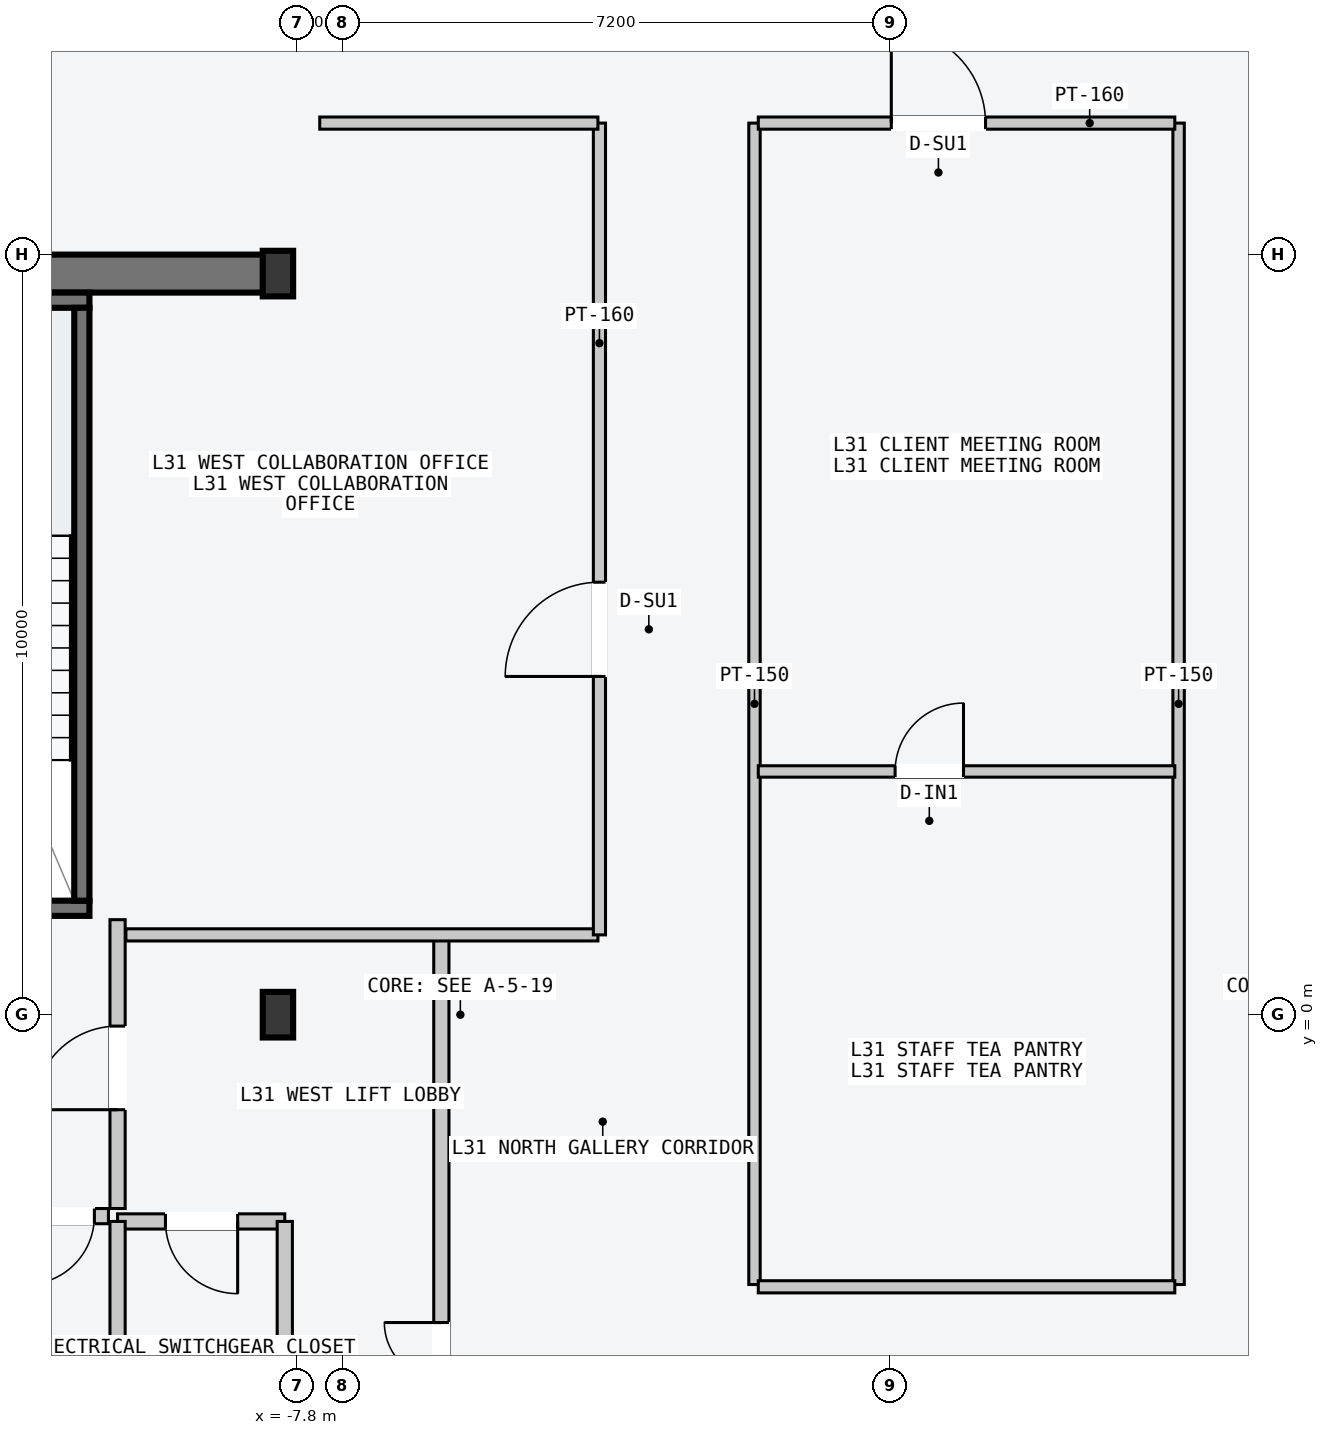
"""IFC4 building model, lengths in metres.
Left out: names, types, materials, properties, quantities, classifications, styles, units other than length and angle.
Written with IfcOpenShell. Run it as: python <this file> out.ifc"""

import sys

from ifc_helpers import new_model, si_unit, direction, frame, frame_2d, origin, origin_2d, place, context, subcontext, project, spatial, rectangle, i_section, extrude, element, fill, save


model = new_model("IFC4")
c1 = context("Model", 3, precision=1e-05, world=origin(), true_north=direction((0.0, 1.0)))
c2 = subcontext(c1, "Body", "Model", "MODEL_VIEW")
j1 = project(units=[si_unit("LENGTHUNIT", "METRE"), si_unit("PLANEANGLEUNIT", "RADIAN")], contexts=[c1])
p1 = place(None, origin())
s1 = spatial("IfcSite", under=j1, at=p1, CompositionType="ELEMENT")
p2 = place(p1, origin())
s2 = spatial("IfcBuilding", under=s1, at=p2, CompositionType="ELEMENT")
p3 = place(p2, frame((0.0, 0.0, 120.6)))
s3 = spatial("IfcBuildingStorey", under=s2, at=p3, CompositionType="ELEMENT", Elevation=120.6)
p4 = place(p3, frame((-14.53, 9.75, -0.2), z_axis=(0.0, 0.0, 1.0), x_axis=(1.0, 0.0, 0.0)))
e1 = element("IfcWall", 1, at=p4, inside=s3, PredefinedType="SHEAR", context=c2, shape_type="SweptSolid", body=[
    extrude(rectangle(XDim=6.46, YDim=0.5, at=frame_2d((3.23, 0.0))), origin(), (0.0, 0.0, 1.0), 3.6),
])
p5 = place(p3, frame((-14.25, 1.4, -0.2), z_axis=(0.0, 0.0, 1.0), x_axis=(1.0, 0.0, 0.0)))
e2 = element("IfcWall", 2, at=p5, inside=s3, PredefinedType="SOLIDWALL", context=c2, shape_type="SweptSolid", body=[
    extrude(rectangle(XDim=3.72, YDim=0.2, at=frame_2d((1.86, 0.0))), origin(), (0.0, 0.0, 1.0), 3.6),
])
p6 = place(p5, frame((1.5, 0.0, 0.2)))
e3 = element("IfcOpeningElement", 3, at=p6, cuts=e2, PredefinedType="OPENING", context=c2, shape_type="SweptSolid", body=[
    extrude(rectangle(XDim=1.12, YDim=2.18, at=frame_2d((0.56, 1.09))), frame((0.0, 0.11, 0.0), z_axis=(0.0, -1.0, 0.0), x_axis=(1.0, 0.0, 0.0)), (0.0, 0.0, 1.0), 0.22),
])
p7 = place(p3, frame((-14.25, 9.4, -0.2), z_axis=(0.0, 0.0, 1.0), x_axis=(1.0, 0.0, 0.0)))
e4 = element("IfcWall", 4, at=p7, inside=s3, PredefinedType="SOLIDWALL", context=c2, shape_type="SweptSolid", body=[
    extrude(rectangle(XDim=3.72, YDim=0.2, at=frame_2d((1.86, 0.0))), origin(), (0.0, 0.0, 1.0), 3.6),
])
p8 = place(p3, frame((-10.63, 1.5, -0.2), z_axis=(0.0, 0.0, 1.0), x_axis=(0.0, 1.0, 0.0)))
e5 = element("IfcWall", 5, at=p8, inside=s3, PredefinedType="SOLIDWALL", context=c2, shape_type="SweptSolid", body=[
    extrude(rectangle(XDim=7.8, YDim=0.2, at=frame_2d((3.9, 0.0))), origin(), (0.0, 0.0, 1.0), 3.6),
])
for number, where, z_axis, x_axis in (
    (6, (-8.05, 0.0, 0.0), (0.0, 0.0, 1.0), (1.0, 0.0, 0.0)),
    (7, (-8.05, 9.75, 0.0), (0.0, 0.0, 1.0), (1.0, 0.0, 0.0)),
):
    element("IfcColumn", number, at=place(p3, frame(where, z_axis=z_axis, x_axis=x_axis)), inside=s3, PredefinedType="COLUMN", context=c2, shape_type="SweptSolid", body=[
        extrude(i_section(OverallWidth=0.4, OverallDepth=0.6, WebThickness=0.022, FlangeThickness=0.036, at=origin_2d()), origin(), (0.0, 0.0, 1.0), 3.6),
    ])
p9 = place(p3, frame((-5.9, -9.45, 0.0), z_axis=(0.0, 0.0, 1.0), x_axis=(0.0, 1.0, 0.0)))
e8 = element("IfcWall", 8, at=p9, inside=s3, PredefinedType="PARTITIONING", context=c2, shape_type="SweptSolid", body=[
    extrude(rectangle(XDim=10.5, YDim=0.2, at=frame_2d((5.25, 0.0))), origin(), (0.0, 0.0, 1.0), 3.4),
])
p10 = place(p9, frame((3.9, 0.0, 0.0)))
e9 = element("IfcOpeningElement", 9, at=p10, cuts=e8, PredefinedType="OPENING", context=c2, shape_type="SweptSolid", body=[
    extrude(rectangle(XDim=1.5, YDim=2.2, at=frame_2d((0.75, 1.1))), frame((0.0, 0.11, 0.0), z_axis=(0.0, -1.0, 0.0), x_axis=(1.0, 0.0, 0.0)), (0.0, 0.0, 1.0), 0.22),
])
p11 = place(p3, frame((-10.16, -2.55, 0.0), z_axis=(0.0, 0.0, 1.0), x_axis=(0.0, 1.0, 0.0)))
e10 = element("IfcWall", 10, at=p11, inside=s3, PredefinedType="PARTITIONING", context=c2, shape_type="SweptSolid", body=[
    extrude(rectangle(XDim=3.8, YDim=0.2, at=frame_2d((1.9, 0.0))), origin(), (0.0, 0.0, 1.0), 3.4),
])
p12 = place(p11, frame((1.3, 0.0, 0.0)))
e11 = element("IfcOpeningElement", 11, at=p12, cuts=e10, PredefinedType="OPENING", context=c2, shape_type="SweptSolid", body=[
    extrude(rectangle(XDim=1.1, YDim=2.15, at=frame_2d((0.55, 1.075))), frame((0.0, 0.11, 0.0), z_axis=(0.0, -1.0, 0.0), x_axis=(1.0, 0.0, 0.0)), (0.0, 0.0, 1.0), 0.22),
])
p13 = place(p3, frame((-10.28, -2.65, 0.0), z_axis=(0.0, 0.0, 1.0), x_axis=(-1.0, 0.0, 0.0)))
e12 = element("IfcWall", 12, at=p13, inside=s3, PredefinedType="PARTITIONING", context=c2, shape_type="SweptSolid", body=[
    extrude(rectangle(XDim=1.27, YDim=0.2, at=frame_2d((0.635, 0.0))), origin(), (0.0, 0.0, 1.0), 3.4),
])
p14 = place(p13, frame((0.185, 0.0, 0.0)))
e13 = element("IfcOpeningElement", 13, at=p14, cuts=e12, PredefinedType="OPENING", context=c2, shape_type="SweptSolid", body=[
    extrude(rectangle(XDim=0.9, YDim=2.15, at=frame_2d((0.45, 1.075))), frame((0.0, 0.11, 0.0), z_axis=(0.0, -1.0, 0.0), x_axis=(1.0, 0.0, 0.0)), (0.0, 0.0, 1.0), 0.22),
])
p15 = place(p3, frame((-7.96, -2.72, 0.0), z_axis=(0.0, 0.0, 1.0), x_axis=(-1.0, 0.0, 0.0)))
e14 = element("IfcWall", 14, at=p15, inside=s3, PredefinedType="PARTITIONING", context=c2, shape_type="SweptSolid", body=[
    extrude(rectangle(XDim=2.2, YDim=0.2, at=frame_2d((1.1, 0.0))), origin(), (0.0, 0.0, 1.0), 3.4),
])
p16 = place(p15, frame((0.62, 0.0, 0.0)))
e15 = element("IfcOpeningElement", 15, at=p16, cuts=e14, PredefinedType="OPENING", context=c2, shape_type="SweptSolid", body=[
    extrude(rectangle(XDim=0.95, YDim=2.1, at=frame_2d((0.475, 1.05))), frame((0.0, 0.11, 0.0), z_axis=(0.0, -1.0, 0.0), x_axis=(1.0, 0.0, 0.0)), (0.0, 0.0, 1.0), 0.22),
])
for number, where, z_axis, x_axis in (
    (16, (-7.96, -5.16, 0.0), (0.0, 0.0, 1.0), (0.0, 1.0, 0.0)),
    (17, (-10.16, -5.16, 0.0), (0.0, 0.0, 1.0), (0.0, 1.0, 0.0)),
):
    element("IfcWall", number, at=place(p3, frame(where, z_axis=z_axis, x_axis=x_axis)), inside=s3, PredefinedType="PARTITIONING", context=c2, shape_type="SweptSolid", body=[
        extrude(rectangle(XDim=2.44, YDim=0.2, at=frame_2d((1.22, 0.0))), origin(), (0.0, 0.0, 1.0), 3.4),
    ])
p17 = place(p3, frame((-10.05, 1.05, 0.0), z_axis=(0.0, 0.0, 1.0), x_axis=(1.0, 0.0, 0.0)))
e18 = element("IfcWall", 18, at=p17, inside=s3, PredefinedType="PARTITIONING", context=c2, shape_type="SweptSolid", body=[
    extrude(rectangle(XDim=6.21, YDim=0.16, at=frame_2d((3.105, 0.0))), origin(), (0.0, 0.0, 1.0), 3.4),
])
p18 = place(p3, frame((-3.82, 1.05, 0.0), z_axis=(0.0, 0.0, 1.0), x_axis=(0.0, 1.0, 0.0)))
e19 = element("IfcWall", 19, at=p18, inside=s3, PredefinedType="PARTITIONING", context=c2, shape_type="SweptSolid", body=[
    extrude(rectangle(XDim=10.68, YDim=0.16, at=frame_2d((5.34, 0.0))), origin(), (0.0, 0.0, 1.0), 3.4),
])
p19 = place(p18, frame((3.4, 0.0, 0.0)))
e20 = element("IfcOpeningElement", 20, at=p19, cuts=e19, PredefinedType="OPENING", context=c2, shape_type="SweptSolid", body=[
    extrude(rectangle(XDim=1.24, YDim=2.24, at=frame_2d((0.62, 1.12))), frame((0.0, 0.09, 0.0), z_axis=(0.0, -1.0, 0.0), x_axis=(1.0, 0.0, 0.0)), (0.0, 0.0, 1.0), 0.18),
])
p20 = place(p3, frame((-7.5, 11.73, 0.0), z_axis=(0.0, 0.0, 1.0), x_axis=(1.0, 0.0, 0.0)))
e21 = element("IfcWall", 21, at=p20, inside=s3, PredefinedType="PARTITIONING", context=c2, shape_type="SweptSolid", body=[
    extrude(rectangle(XDim=3.66, YDim=0.16, at=frame_2d((1.83, 0.0))), origin(), (0.0, 0.0, 1.0), 3.4),
])
for number, where, z_axis, x_axis in (
    (22, (-1.78, -3.55, 0.0), (0.0, 0.0, 1.0), (0.0, 1.0, 0.0)),
    (23, (3.8, -3.55, 0.0), (0.0, 0.0, 1.0), (0.0, 1.0, 0.0)),
):
    element("IfcWall", number, at=place(p3, frame(where, z_axis=z_axis, x_axis=x_axis)), inside=s3, PredefinedType="PARTITIONING", context=c2, shape_type="SweptSolid", body=[
        extrude(rectangle(XDim=15.28, YDim=0.15, at=frame_2d((7.64, 0.0))), origin(), (0.0, 0.0, 1.0), 3.4),
    ])
p21 = place(p3, frame((-1.73, -3.58, 0.0), z_axis=(0.0, 0.0, 1.0), x_axis=(1.0, 0.0, 0.0)))
e24 = element("IfcWall", 24, at=p21, inside=s3, PredefinedType="PARTITIONING", context=c2, shape_type="SweptSolid", body=[
    extrude(rectangle(XDim=5.48, YDim=0.16, at=frame_2d((2.74, 0.0))), origin(), (0.0, 0.0, 1.0), 3.4),
])
p22 = place(p3, frame((-1.73, 3.2, 0.0), z_axis=(0.0, 0.0, 1.0), x_axis=(1.0, 0.0, 0.0)))
e25 = element("IfcWall", 25, at=p22, inside=s3, PredefinedType="PARTITIONING", context=c2, shape_type="SweptSolid", body=[
    extrude(rectangle(XDim=5.48, YDim=0.15, at=frame_2d((2.74, 0.0))), origin(), (0.0, 0.0, 1.0), 3.4),
])
p23 = place(p22, frame((1.8, 0.0, 0.0)))
e26 = element("IfcOpeningElement", 26, at=p23, cuts=e25, PredefinedType="OPENING", context=c2, shape_type="SweptSolid", body=[
    extrude(rectangle(XDim=0.9, YDim=2.15, at=frame_2d((0.45, 1.075))), frame((0.0, 0.085, 0.0), z_axis=(0.0, -1.0, 0.0), x_axis=(1.0, 0.0, 0.0)), (0.0, 0.0, 1.0), 0.17),
])
p24 = place(p3, frame((-1.73, 11.73, 0.0), z_axis=(0.0, 0.0, 1.0), x_axis=(1.0, 0.0, 0.0)))
e27 = element("IfcWall", 27, at=p24, inside=s3, PredefinedType="PARTITIONING", context=c2, shape_type="SweptSolid", body=[
    extrude(rectangle(XDim=5.48, YDim=0.16, at=frame_2d((2.74, 0.0))), origin(), (0.0, 0.0, 1.0), 3.4),
])
p25 = place(p24, frame((1.75, 0.0, 0.0)))
e28 = element("IfcOpeningElement", 28, at=p25, cuts=e27, PredefinedType="OPENING", context=c2, shape_type="SweptSolid", body=[
    extrude(rectangle(XDim=1.24, YDim=2.24, at=frame_2d((0.62, 1.12))), frame((0.0, 0.09, 0.0), z_axis=(0.0, -1.0, 0.0), x_axis=(1.0, 0.0, 0.0)), (0.0, 0.0, 1.0), 0.18),
])
p26 = place(p10, origin())
e29 = element("IfcDoor", 29, at=p26, inside=s3, OperationType="DOUBLE_DOOR_SINGLE_SWING", PredefinedType="DOOR", context=c2, shape_type="SweptSolid", body=[
    extrude(rectangle(XDim=1.5, YDim=2.2, at=frame_2d((0.75, 1.1))), frame((0.0, 0.025, 0.0), z_axis=(0.0, -1.0, 0.0), x_axis=(1.0, 0.0, 0.0)), (0.0, 0.0, 1.0), 0.05),
])
fill(e9, e29)
p27 = place(p12, origin())
e30 = element("IfcDoor", 30, at=p27, inside=s3, OperationType="SINGLE_SWING_LEFT", PredefinedType="DOOR", context=c2, shape_type="SweptSolid", body=[
    extrude(rectangle(XDim=1.1, YDim=2.15, at=frame_2d((0.55, 1.075))), frame((0.0, 0.025, 0.0), z_axis=(0.0, -1.0, 0.0), x_axis=(1.0, 0.0, 0.0)), (0.0, 0.0, 1.0), 0.05),
])
fill(e11, e30)
p28 = place(p14, origin())
e31 = element("IfcDoor", 31, at=p28, inside=s3, OperationType="SINGLE_SWING_RIGHT", PredefinedType="DOOR", context=c2, shape_type="SweptSolid", body=[
    extrude(rectangle(XDim=0.9, YDim=2.15, at=frame_2d((0.45, 1.075))), frame((0.0, 0.025, 0.0), z_axis=(0.0, -1.0, 0.0), x_axis=(1.0, 0.0, 0.0)), (0.0, 0.0, 1.0), 0.05),
])
fill(e13, e31)
p29 = place(p16, origin())
e32 = element("IfcDoor", 32, at=p29, inside=s3, OperationType="SINGLE_SWING_LEFT", PredefinedType="DOOR", context=c2, shape_type="SweptSolid", body=[
    extrude(rectangle(XDim=0.95, YDim=2.1, at=frame_2d((0.475, 1.05))), frame((0.0, 0.025, 0.0), z_axis=(0.0, -1.0, 0.0), x_axis=(1.0, 0.0, 0.0)), (0.0, 0.0, 1.0), 0.05),
])
fill(e15, e32)
p30 = place(p19, origin())
e33 = element("IfcDoor", 33, at=p30, inside=s3, OperationType="SINGLE_SWING_LEFT", PredefinedType="DOOR", context=c2, shape_type="SweptSolid", body=[
    extrude(rectangle(XDim=1.24, YDim=2.24, at=frame_2d((0.62, 1.12))), frame((0.0, 0.025, 0.0), z_axis=(0.0, -1.0, 0.0), x_axis=(1.0, 0.0, 0.0)), (0.0, 0.0, 1.0), 0.05),
])
fill(e20, e33)
p31 = place(p23, origin())
e34 = element("IfcDoor", 34, at=p31, inside=s3, OperationType="SINGLE_SWING_RIGHT", PredefinedType="DOOR", context=c2, shape_type="SweptSolid", body=[
    extrude(rectangle(XDim=0.9, YDim=2.15, at=frame_2d((0.45, 1.075))), frame((0.0, 0.025, 0.0), z_axis=(0.0, -1.0, 0.0), x_axis=(1.0, 0.0, 0.0)), (0.0, 0.0, 1.0), 0.05),
])
fill(e26, e34)
p32 = place(p25, origin())
e35 = element("IfcDoor", 35, at=p32, inside=s3, OperationType="SINGLE_SWING_LEFT", PredefinedType="DOOR", context=c2, shape_type="SweptSolid", body=[
    extrude(rectangle(XDim=1.24, YDim=2.24, at=frame_2d((0.62, 1.12))), frame((0.0, 0.025, 0.0), z_axis=(0.0, -1.0, 0.0), x_axis=(1.0, 0.0, 0.0)), (0.0, 0.0, 1.0), 0.05),
])
fill(e28, e35)
save(model, sys.argv[1])
